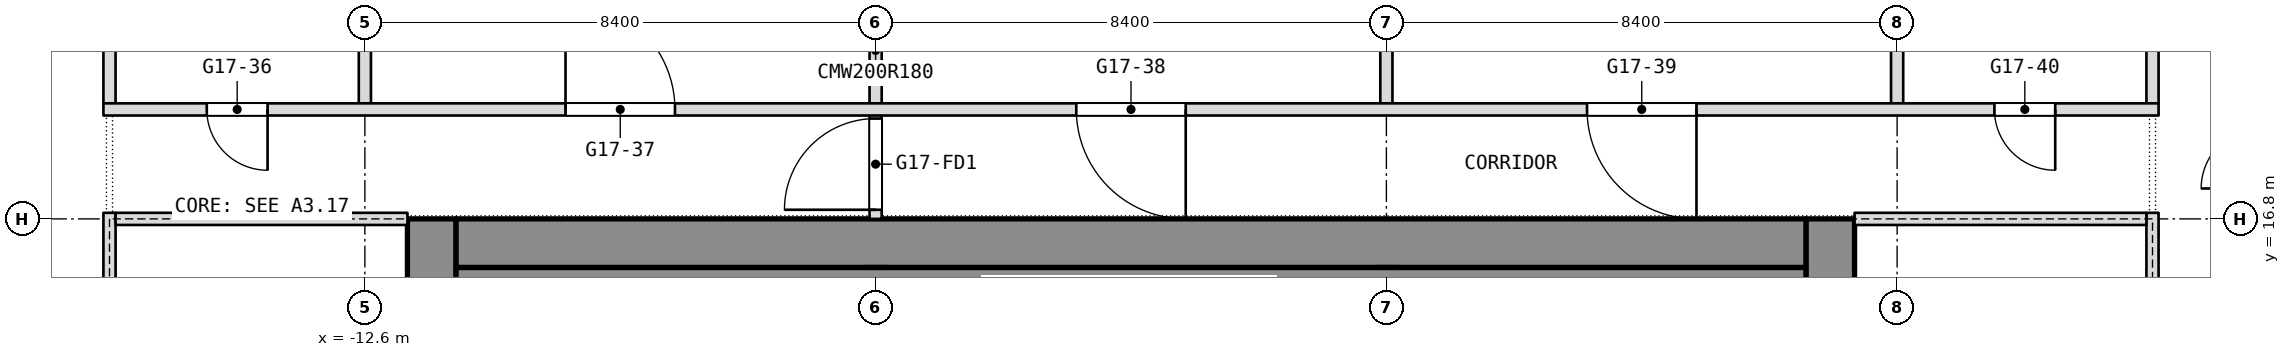
"""IFC4 building model, lengths in metres.
Left out: names, types, materials, properties, quantities, classifications, styles, units other than length and angle.
Written with IfcOpenShell. Run it as: python <this file> out.ifc"""

import sys

from ifc_helpers import new_model, si_unit, direction, frame, frame_2d, origin, place, context, subcontext, project, spatial, rectangle, extrude, element, fill, save


model = new_model("IFC4")
c1 = context("Model", 3, precision=1e-05, world=origin(), true_north=direction((0.0, 1.0)))
c2 = subcontext(c1, "Body", "Model", "MODEL_VIEW")
j1 = project(units=[si_unit("LENGTHUNIT", "METRE"), si_unit("PLANEANGLEUNIT", "RADIAN")], contexts=[c1])
p1 = place(None, origin())
s1 = spatial("IfcSite", under=j1, at=p1, CompositionType="ELEMENT")
p2 = place(p1, origin())
s2 = spatial("IfcBuilding", under=s1, at=p2, CompositionType="ELEMENT")
p3 = place(p2, frame((0.0, 0.0, 209.3)))
s3 = spatial("IfcBuildingStorey", under=s2, at=p3, CompositionType="ELEMENT", Elevation=209.3)
p4 = place(p3, frame((11.5, 0.0, 0.0), z_axis=(0.0, 0.0, 1.0), x_axis=(0.0, 1.0, 0.0)))
e1 = element("IfcWall", 1, at=p4, inside=s3, PredefinedType="SHEAR", context=c2, shape_type="SweptSolid", body=[
    extrude(rectangle(XDim=16.8, YDim=0.8, at=frame_2d((8.4, 0.0))), origin(), (0.0, 0.0, 1.0), 3.6),
])
p5 = place(p4, frame((2.3, 0.0, 0.0)))
e2 = element("IfcOpeningElement", 2, at=p5, cuts=e1, PredefinedType="OPENING", context=c2, shape_type="SweptSolid", body=[
    extrude(rectangle(XDim=1.1, YDim=2.1, at=frame_2d((0.55, 1.05))), frame((0.0, 0.4, 0.0), z_axis=(0.0, -1.0, 0.0), x_axis=(1.0, 0.0, 0.0)), (0.0, 0.0, 1.0), 0.8),
])
p6 = place(p4, frame((4.85, 0.0, 0.0)))
e3 = element("IfcOpeningElement", 3, at=p6, cuts=e1, PredefinedType="OPENING", context=c2, shape_type="SweptSolid", body=[
    extrude(rectangle(XDim=1.1, YDim=2.1, at=frame_2d((0.55, 1.05))), frame((0.0, 0.4, 0.0), z_axis=(0.0, -1.0, 0.0), x_axis=(1.0, 0.0, 0.0)), (0.0, 0.0, 1.0), 0.8),
])
p7 = place(p4, frame((6.825, 0.0, 0.0)))
e4 = element("IfcOpeningElement", 4, at=p7, cuts=e1, PredefinedType="OPENING", context=c2, shape_type="SweptSolid", body=[
    extrude(rectangle(XDim=1.2, YDim=2.1, at=frame_2d((0.6, 1.05))), frame((0.0, 0.4, 0.0), z_axis=(0.0, -1.0, 0.0), x_axis=(1.0, 0.0, 0.0)), (0.0, 0.0, 1.0), 0.8),
])
p8 = place(p4, frame((13.4, 0.0, 0.0)))
e5 = element("IfcOpeningElement", 5, at=p8, cuts=e1, PredefinedType="OPENING", context=c2, shape_type="SweptSolid", body=[
    extrude(rectangle(XDim=1.1, YDim=2.1, at=frame_2d((0.55, 1.05))), frame((0.0, 0.4, 0.0), z_axis=(0.0, -1.0, 0.0), x_axis=(1.0, 0.0, 0.0)), (0.0, 0.0, 1.0), 0.8),
])
p9 = place(p4, frame((10.85, 0.0, 0.0)))
e6 = element("IfcOpeningElement", 6, at=p9, cuts=e1, PredefinedType="OPENING", context=c2, shape_type="SweptSolid", body=[
    extrude(rectangle(XDim=1.1, YDim=2.1, at=frame_2d((0.55, 1.05))), frame((0.0, 0.4, 0.0), z_axis=(0.0, -1.0, 0.0), x_axis=(1.0, 0.0, 0.0)), (0.0, 0.0, 1.0), 0.8),
])
p10 = place(p4, frame((8.775, 0.0, 0.0)))
e7 = element("IfcOpeningElement", 7, at=p10, cuts=e1, PredefinedType="OPENING", context=c2, shape_type="SweptSolid", body=[
    extrude(rectangle(XDim=1.2, YDim=2.1, at=frame_2d((0.6, 1.05))), frame((0.0, 0.4, 0.0), z_axis=(0.0, -1.0, 0.0), x_axis=(1.0, 0.0, 0.0)), (0.0, 0.0, 1.0), 0.8),
])
p11 = place(p3, frame((-11.5, 0.0, 0.0), z_axis=(0.0, 0.0, 1.0), x_axis=(0.0, 1.0, 0.0)))
e8 = element("IfcWall", 8, at=p11, inside=s3, PredefinedType="SHEAR", context=c2, shape_type="SweptSolid", body=[
    extrude(rectangle(XDim=16.8, YDim=0.8, at=frame_2d((8.4, 0.0))), origin(), (0.0, 0.0, 1.0), 3.6),
])
p12 = place(p11, frame((1.762, 0.0, 0.0)))
e9 = element("IfcOpeningElement", 9, at=p12, cuts=e8, PredefinedType="OPENING", context=c2, shape_type="SweptSolid", body=[
    extrude(rectangle(XDim=0.9, YDim=2.1, at=frame_2d((0.45, 1.05))), frame((0.0, 0.4, 0.0), z_axis=(0.0, -1.0, 0.0), x_axis=(1.0, 0.0, 0.0)), (0.0, 0.0, 1.0), 0.8),
])
p13 = place(p11, frame((4.387, 0.0, 0.0)))
e10 = element("IfcOpeningElement", 10, at=p13, cuts=e8, PredefinedType="OPENING", context=c2, shape_type="SweptSolid", body=[
    extrude(rectangle(XDim=0.9, YDim=2.1, at=frame_2d((0.45, 1.05))), frame((0.0, 0.4, 0.0), z_axis=(0.0, -1.0, 0.0), x_axis=(1.0, 0.0, 0.0)), (0.0, 0.0, 1.0), 0.8),
])
p14 = place(p11, frame((6.825, 0.0, 0.0)))
e11 = element("IfcOpeningElement", 11, at=p14, cuts=e8, PredefinedType="OPENING", context=c2, shape_type="SweptSolid", body=[
    extrude(rectangle(XDim=1.2, YDim=2.1, at=frame_2d((0.6, 1.05))), frame((0.0, 0.4, 0.0), z_axis=(0.0, -1.0, 0.0), x_axis=(1.0, 0.0, 0.0)), (0.0, 0.0, 1.0), 0.8),
])
p15 = place(p11, frame((12.3, 0.0, 0.0)))
e12 = element("IfcOpeningElement", 12, at=p15, cuts=e8, PredefinedType="OPENING", context=c2, shape_type="SweptSolid", body=[
    extrude(rectangle(XDim=0.9, YDim=2.1, at=frame_2d((0.45, 1.05))), frame((0.0, 0.4, 0.0), z_axis=(0.0, -1.0, 0.0), x_axis=(1.0, 0.0, 0.0)), (0.0, 0.0, 1.0), 0.8),
])
p16 = place(p11, frame((8.775, 0.0, 0.0)))
e13 = element("IfcOpeningElement", 13, at=p16, cuts=e8, PredefinedType="OPENING", context=c2, shape_type="SweptSolid", body=[
    extrude(rectangle(XDim=1.2, YDim=2.1, at=frame_2d((0.6, 1.05))), frame((0.0, 0.4, 0.0), z_axis=(0.0, -1.0, 0.0), x_axis=(1.0, 0.0, 0.0)), (0.0, 0.0, 1.0), 0.8),
])
p17 = place(p3, frame((-11.1, 16.4, 0.0), z_axis=(0.0, 0.0, 1.0), x_axis=(1.0, 0.0, 0.0)))
e14 = element("IfcWall", 14, at=p17, inside=s3, PredefinedType="SHEAR", context=c2, shape_type="SweptSolid", body=[
    extrude(rectangle(XDim=22.2, YDim=0.8, at=frame_2d((11.1, 0.0))), origin(), (0.0, 0.0, 1.0), 3.6),
])
p18 = place(p3, frame((-4.2, 0.8, 0.0), z_axis=(0.0, 0.0, 1.0), x_axis=(0.0, 1.0, 0.0)))
e15 = element("IfcWall", 15, at=p18, inside=s3, PredefinedType="SHEAR", context=c2, shape_type="SweptSolid", body=[
    extrude(rectangle(XDim=15.2, YDim=0.4, at=frame_2d((7.6, 0.0))), origin(), (0.0, 0.0, 1.0), 3.6),
])
p19 = place(p18, frame((8.5, 0.0, 0.0)))
e16 = element("IfcOpeningElement", 16, at=p19, cuts=e15, PredefinedType="OPENING", context=c2, shape_type="SweptSolid", body=[
    extrude(rectangle(XDim=1.2, YDim=2.1, at=frame_2d((0.6, 1.05))), frame((0.0, 0.2, 0.0), z_axis=(0.0, -1.0, 0.0), x_axis=(1.0, 0.0, 0.0)), (0.0, 0.0, 1.0), 0.4),
])
p20 = place(p3, frame((4.2, 0.8, 0.0), z_axis=(0.0, 0.0, 1.0), x_axis=(0.0, 1.0, 0.0)))
e17 = element("IfcWall", 17, at=p20, inside=s3, PredefinedType="SHEAR", context=c2, shape_type="SweptSolid", body=[
    extrude(rectangle(XDim=15.2, YDim=0.4, at=frame_2d((7.6, 0.0))), origin(), (0.0, 0.0, 1.0), 3.6),
])
p21 = place(p20, frame((5.95, 0.0, 0.0)))
e18 = element("IfcOpeningElement", 18, at=p21, cuts=e17, PredefinedType="OPENING", context=c2, shape_type="SweptSolid", body=[
    extrude(rectangle(XDim=1.2, YDim=2.1, at=frame_2d((0.6, 1.05))), frame((0.0, 0.2, 0.0), z_axis=(0.0, -1.0, 0.0), x_axis=(1.0, 0.0, 0.0)), (0.0, 0.0, 1.0), 0.4),
])
for number, where, z_axis, x_axis in (
    (19, (16.8, 18.7, 0.0), (0.0, 0.0, 1.0), (0.0, 1.0, 0.0)),
    (20, (12.6, 18.7, 0.0), (0.0, 0.0, 1.0), (0.0, 1.0, 0.0)),
    (21, (4.2, 18.7, 0.0), (0.0, 0.0, 1.0), (0.0, 1.0, 0.0)),
):
    element("IfcWall", number, at=place(p3, frame(where, z_axis=z_axis, x_axis=x_axis)), inside=s3, PredefinedType="PARTITIONING", context=c2, shape_type="SweptSolid", body=[
        extrude(rectangle(XDim=3.64, YDim=0.2, at=frame_2d((1.82, 0.0))), origin(), (0.0, 0.0, 1.0), 3.34),
    ])
p22 = place(p3, frame((-4.2, 16.8, 0.0), z_axis=(0.0, 0.0, 1.0), x_axis=(0.0, 1.0, 0.0)))
e22 = element("IfcWall", 22, at=p22, inside=s3, PredefinedType="PARTITIONING", context=c2, shape_type="SweptSolid", body=[
    extrude(rectangle(XDim=5.54, YDim=0.2, at=frame_2d((2.77, 0.0))), origin(), (0.0, 0.0, 1.0), 3.34),
])
p23 = place(p22, frame((0.15, 0.0, 0.0)))
e23 = element("IfcOpeningElement", 23, at=p23, cuts=e22, PredefinedType="OPENING", context=c2, shape_type="SweptSolid", body=[
    extrude(rectangle(XDim=1.5, YDim=2.1, at=frame_2d((0.75, 1.05))), frame((0.0, 0.1, 0.0), z_axis=(0.0, -1.0, 0.0), x_axis=(1.0, 0.0, 0.0)), (0.0, 0.0, 1.0), 0.2),
])
for number, where, z_axis, x_axis in (
    (24, (-12.6, 18.7, 0.0), (0.0, 0.0, 1.0), (0.0, 1.0, 0.0)),
    (25, (-16.8, 18.7, 0.0), (0.0, 0.0, 1.0), (0.0, 1.0, 0.0)),
):
    element("IfcWall", number, at=place(p3, frame(where, z_axis=z_axis, x_axis=x_axis)), inside=s3, PredefinedType="PARTITIONING", context=c2, shape_type="SweptSolid", body=[
        extrude(rectangle(XDim=3.64, YDim=0.2, at=frame_2d((1.82, 0.0))), origin(), (0.0, 0.0, 1.0), 3.34),
    ])
p24 = place(p3, frame((-16.9, 18.6, 0.0), z_axis=(0.0, 0.0, 1.0), x_axis=(1.0, 0.0, 0.0)))
e26 = element("IfcWall", 26, at=p24, inside=s3, PredefinedType="PARTITIONING", context=c2, shape_type="SweptSolid", body=[
    extrude(rectangle(XDim=33.8, YDim=0.2, at=frame_2d((16.9, 0.0))), origin(), (0.0, 0.0, 1.0), 3.34),
])
p25 = place(p24, frame((1.7, 0.0, 0.0)))
e27 = element("IfcOpeningElement", 27, at=p25, cuts=e26, PredefinedType="OPENING", context=c2, shape_type="SweptSolid", body=[
    extrude(rectangle(XDim=1.0, YDim=2.1, at=frame_2d((0.5, 1.05))), frame((0.0, 0.1, 0.0), z_axis=(0.0, -1.0, 0.0), x_axis=(1.0, 0.0, 0.0)), (0.0, 0.0, 1.0), 0.2),
])
p26 = place(p24, frame((7.6, 0.0, 0.0)))
e28 = element("IfcOpeningElement", 28, at=p26, cuts=e26, PredefinedType="OPENING", context=c2, shape_type="SweptSolid", body=[
    extrude(rectangle(XDim=1.8, YDim=2.1, at=frame_2d((0.9, 1.05))), frame((0.0, 0.1, 0.0), z_axis=(0.0, -1.0, 0.0), x_axis=(1.0, 0.0, 0.0)), (0.0, 0.0, 1.0), 0.2),
])
p27 = place(p24, frame((16.0, 0.0, 0.0)))
e29 = element("IfcOpeningElement", 29, at=p27, cuts=e26, PredefinedType="OPENING", context=c2, shape_type="SweptSolid", body=[
    extrude(rectangle(XDim=1.8, YDim=2.1, at=frame_2d((0.9, 1.05))), frame((0.0, 0.1, 0.0), z_axis=(0.0, -1.0, 0.0), x_axis=(1.0, 0.0, 0.0)), (0.0, 0.0, 1.0), 0.2),
])
p28 = place(p24, frame((24.4, 0.0, 0.0)))
e30 = element("IfcOpeningElement", 30, at=p28, cuts=e26, PredefinedType="OPENING", context=c2, shape_type="SweptSolid", body=[
    extrude(rectangle(XDim=1.8, YDim=2.1, at=frame_2d((0.9, 1.05))), frame((0.0, 0.1, 0.0), z_axis=(0.0, -1.0, 0.0), x_axis=(1.0, 0.0, 0.0)), (0.0, 0.0, 1.0), 0.2),
])
p29 = place(p24, frame((31.1, 0.0, 0.0)))
e31 = element("IfcOpeningElement", 31, at=p29, cuts=e26, PredefinedType="OPENING", context=c2, shape_type="SweptSolid", body=[
    extrude(rectangle(XDim=1.0, YDim=2.1, at=frame_2d((0.5, 1.05))), frame((0.0, 0.1, 0.0), z_axis=(0.0, -1.0, 0.0), x_axis=(1.0, 0.0, 0.0)), (0.0, 0.0, 1.0), 0.2),
])
p30 = place(p3, frame((-11.1, 15.65, 0.0), z_axis=(0.0, 0.0, 1.0), x_axis=(1.0, 0.0, 0.0)))
e32 = element("IfcWall", 32, at=p30, inside=s3, PredefinedType="PARTITIONING", context=c2, shape_type="SweptSolid", body=[
    extrude(rectangle(XDim=22.2, YDim=0.7, at=frame_2d((11.1, 0.0))), origin(), (0.0, 0.0, 1.0), 3.34),
])
p31 = place(p3, frame((-16.8, -0.1, 0.0), z_axis=(0.0, 0.0, 1.0), x_axis=(0.0, 1.0, 0.0)))
e33 = element("IfcWall", 33, at=p31, inside=s3, PredefinedType="PARTITIONING", context=c2, shape_type="SweptSolid", body=[
    extrude(rectangle(XDim=17.0, YDim=0.2, at=frame_2d((8.5, 0.0))), origin(), (0.0, 0.0, 1.0), 3.34),
])
p32 = place(p31, frame((2.2, 0.0, 0.0)))
e34 = element("IfcOpeningElement", 34, at=p32, cuts=e33, PredefinedType="OPENING", context=c2, shape_type="SweptSolid", body=[
    extrude(rectangle(XDim=1.8, YDim=2.1, at=frame_2d((0.9, 1.05))), frame((0.0, 0.1, 0.0), z_axis=(0.0, -1.0, 0.0), x_axis=(1.0, 0.0, 0.0)), (0.0, 0.0, 1.0), 0.2),
])
p33 = place(p31, frame((13.0, 0.0, 0.0)))
e35 = element("IfcOpeningElement", 35, at=p33, cuts=e33, PredefinedType="OPENING", context=c2, shape_type="SweptSolid", body=[
    extrude(rectangle(XDim=1.8, YDim=2.1, at=frame_2d((0.9, 1.05))), frame((0.0, 0.1, 0.0), z_axis=(0.0, -1.0, 0.0), x_axis=(1.0, 0.0, 0.0)), (0.0, 0.0, 1.0), 0.2),
])
p34 = place(p3, frame((-16.7, 16.8, 0.0), z_axis=(0.0, 0.0, 1.0), x_axis=(1.0, 0.0, 0.0)))
e36 = element("IfcWall", 36, at=p34, inside=s3, PredefinedType="PARTITIONING", context=c2, shape_type="SweptSolid", body=[
    extrude(rectangle(XDim=4.8, YDim=0.2, at=frame_2d((2.4, 0.0))), origin(), (0.0, 0.0, 1.0), 2.94),
])
p35 = place(p3, frame((16.8, -0.1, 0.0), z_axis=(0.0, 0.0, 1.0), x_axis=(0.0, 1.0, 0.0)))
e37 = element("IfcWall", 37, at=p35, inside=s3, PredefinedType="PARTITIONING", context=c2, shape_type="SweptSolid", body=[
    extrude(rectangle(XDim=17.0, YDim=0.2, at=frame_2d((8.5, 0.0))), origin(), (0.0, 0.0, 1.0), 3.34),
])
p36 = place(p35, frame((2.2, 0.0, 0.0)))
e38 = element("IfcOpeningElement", 38, at=p36, cuts=e37, PredefinedType="OPENING", context=c2, shape_type="SweptSolid", body=[
    extrude(rectangle(XDim=1.8, YDim=2.1, at=frame_2d((0.9, 1.05))), frame((0.0, 0.1, 0.0), z_axis=(0.0, -1.0, 0.0), x_axis=(1.0, 0.0, 0.0)), (0.0, 0.0, 1.0), 0.2),
])
p37 = place(p35, frame((13.0, 0.0, 0.0)))
e39 = element("IfcOpeningElement", 39, at=p37, cuts=e37, PredefinedType="OPENING", context=c2, shape_type="SweptSolid", body=[
    extrude(rectangle(XDim=1.8, YDim=2.1, at=frame_2d((0.9, 1.05))), frame((0.0, 0.1, 0.0), z_axis=(0.0, -1.0, 0.0), x_axis=(1.0, 0.0, 0.0)), (0.0, 0.0, 1.0), 0.2),
])
p38 = place(p3, frame((11.9, 16.8, 0.0), z_axis=(0.0, 0.0, 1.0), x_axis=(1.0, 0.0, 0.0)))
e40 = element("IfcWall", 40, at=p38, inside=s3, PredefinedType="PARTITIONING", context=c2, shape_type="SweptSolid", body=[
    extrude(rectangle(XDim=4.8, YDim=0.2, at=frame_2d((2.4, 0.0))), origin(), (0.0, 0.0, 1.0), 2.94),
])
p39 = place(p25, origin())
e41 = element("IfcDoor", 41, at=p39, inside=s3, OperationType="SINGLE_SWING_RIGHT", PredefinedType="DOOR", context=c2, shape_type="SweptSolid", body=[
    extrude(rectangle(XDim=1.0, YDim=2.1, at=frame_2d((0.5, 1.05))), frame((0.0, 0.025, 0.0), z_axis=(0.0, -1.0, 0.0), x_axis=(1.0, 0.0, 0.0)), (0.0, 0.0, 1.0), 0.05),
])
fill(e27, e41)
p40 = place(p26, origin())
e42 = element("IfcDoor", 42, at=p40, inside=s3, OperationType="DOUBLE_DOOR_SINGLE_SWING", PredefinedType="DOOR", context=c2, shape_type="SweptSolid", body=[
    extrude(rectangle(XDim=1.8, YDim=2.1, at=frame_2d((0.9, 1.05))), frame((0.0, 0.025, 0.0), z_axis=(0.0, -1.0, 0.0), x_axis=(1.0, 0.0, 0.0)), (0.0, 0.0, 1.0), 0.05),
])
fill(e28, e42)
p41 = place(p27, origin())
e43 = element("IfcDoor", 43, at=p41, inside=s3, OperationType="DOUBLE_DOOR_SINGLE_SWING", PredefinedType="DOOR", context=c2, shape_type="SweptSolid", body=[
    extrude(rectangle(XDim=1.8, YDim=2.1, at=frame_2d((0.9, 1.05))), frame((0.0, 0.025, 0.0), z_axis=(0.0, -1.0, 0.0), x_axis=(1.0, 0.0, 0.0)), (0.0, 0.0, 1.0), 0.05),
])
fill(e29, e43)
p42 = place(p28, origin())
e44 = element("IfcDoor", 44, at=p42, inside=s3, OperationType="DOUBLE_DOOR_SINGLE_SWING", PredefinedType="DOOR", context=c2, shape_type="SweptSolid", body=[
    extrude(rectangle(XDim=1.8, YDim=2.1, at=frame_2d((0.9, 1.05))), frame((0.0, 0.025, 0.0), z_axis=(0.0, -1.0, 0.0), x_axis=(1.0, 0.0, 0.0)), (0.0, 0.0, 1.0), 0.05),
])
fill(e30, e44)
p43 = place(p29, origin())
e45 = element("IfcDoor", 45, at=p43, inside=s3, OperationType="SINGLE_SWING_RIGHT", PredefinedType="DOOR", context=c2, shape_type="SweptSolid", body=[
    extrude(rectangle(XDim=1.0, YDim=2.1, at=frame_2d((0.5, 1.05))), frame((0.0, 0.025, 0.0), z_axis=(0.0, -1.0, 0.0), x_axis=(1.0, 0.0, 0.0)), (0.0, 0.0, 1.0), 0.05),
])
fill(e31, e45)
p44 = place(p23, origin())
e46 = element("IfcDoor", 46, at=p44, inside=s3, OperationType="DOUBLE_DOOR_DOUBLE_SWING", PredefinedType="DOOR", context=c2, shape_type="SweptSolid", body=[
    extrude(rectangle(XDim=1.5, YDim=2.1, at=frame_2d((0.75, 1.05))), frame((0.0, 0.025, 0.0), z_axis=(0.0, -1.0, 0.0), x_axis=(1.0, 0.0, 0.0)), (0.0, 0.0, 1.0), 0.05),
])
fill(e23, e46)
save(model, sys.argv[1])
